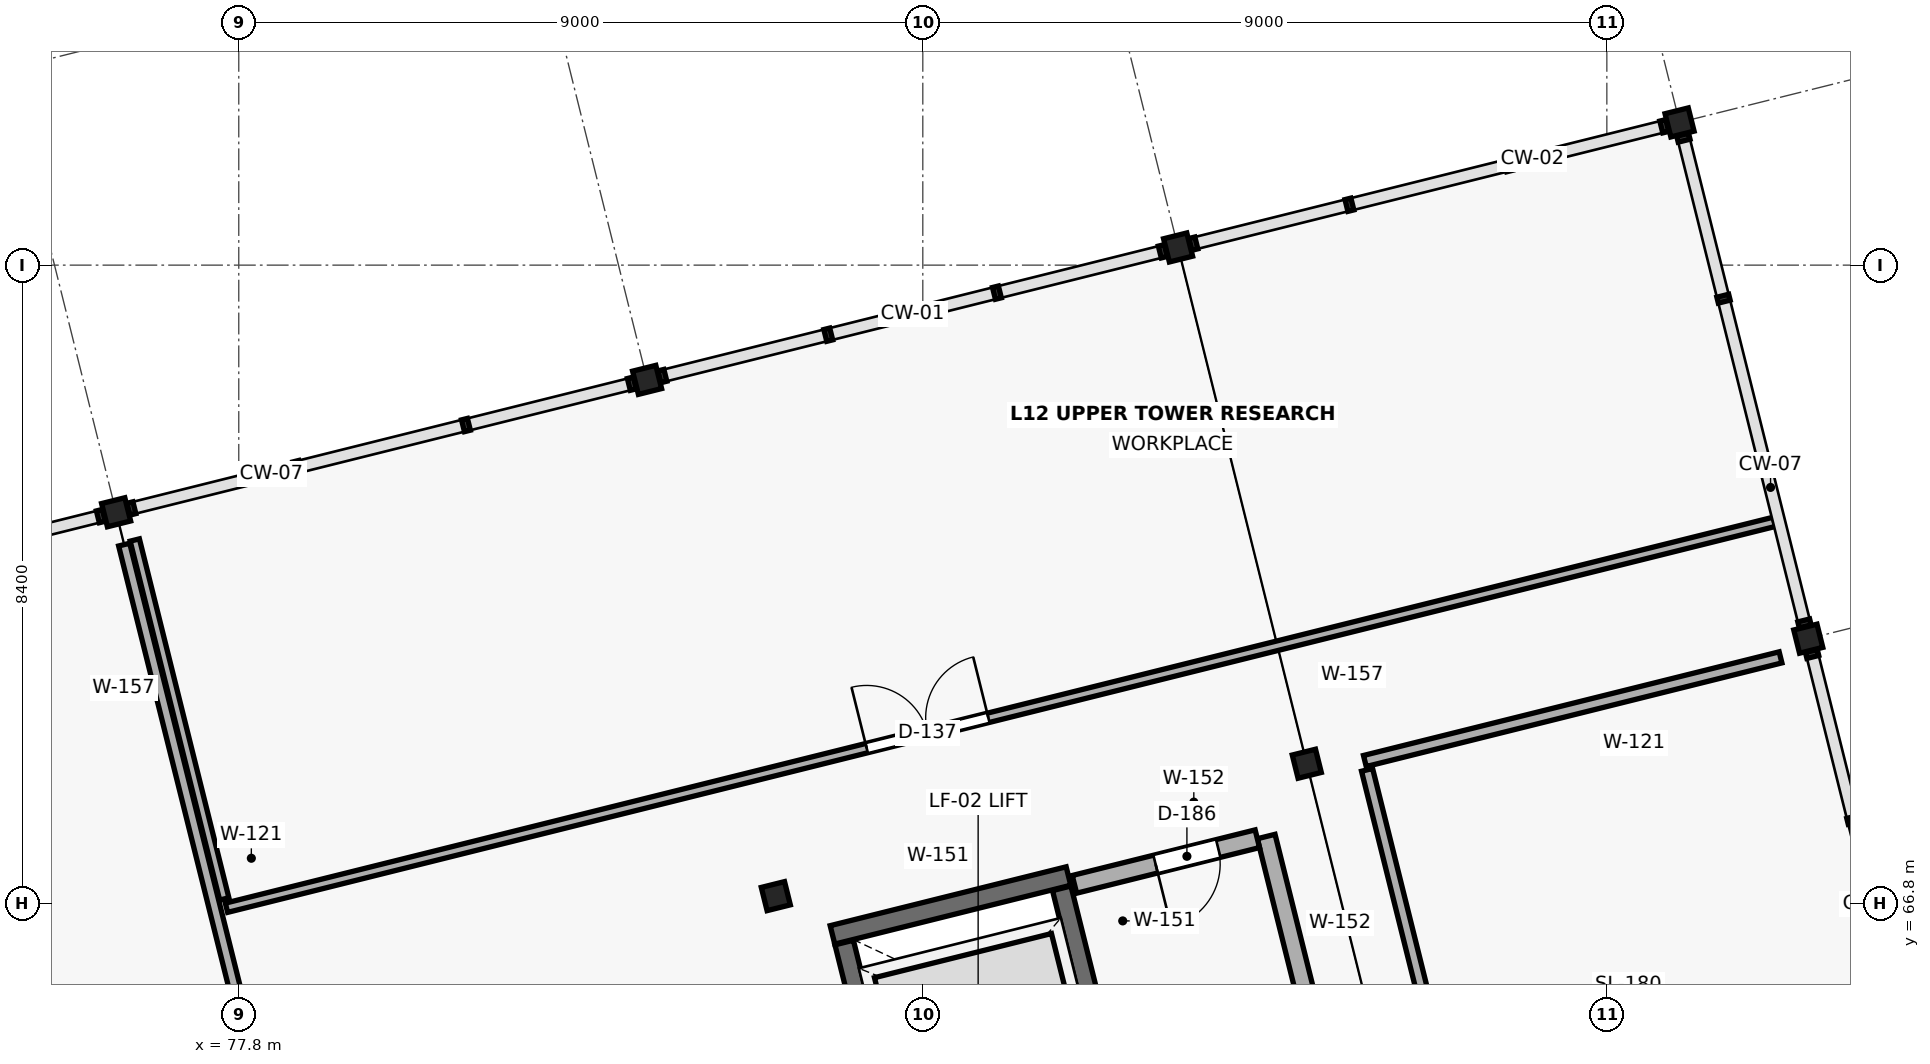
"""IFC4 building model, lengths in metres.
Left out: names, types, materials, properties, quantities, classifications, styles, units other than length and angle.
Written with IfcOpenShell. Run it as: python <this file> out.ifc"""

import sys

from ifc_helpers import new_model, si_unit, direction, frame, frame_2d, origin, origin_2d, place, context, subcontext, project, spatial, rectangle, extrude, element, fill, save


model = new_model("IFC4")
c1 = context("Model", 3, precision=1e-05, world=origin(), true_north=direction((0.0, 1.0)))
c2 = subcontext(c1, "Body", "Model", "MODEL_VIEW")
j1 = project(units=[si_unit("LENGTHUNIT", "METRE"), si_unit("PLANEANGLEUNIT", "RADIAN")], contexts=[c1])
p1 = place(None, origin())
s1 = spatial("IfcSite", under=j1, at=p1, CompositionType="ELEMENT")
p2 = place(p1, origin())
s2 = spatial("IfcBuilding", under=s1, at=p2, CompositionType="ELEMENT")
p3 = place(p2, frame((0.0, 0.0, 49.5)))
s3 = spatial("IfcBuildingStorey", under=s2, at=p3, CompositionType="ELEMENT", Elevation=49.5)
for number, where, z_axis, x_axis in (
    (1, (76.187, 71.949, 0.0), (0.0, 0.0, 1.0), (0.97, 0.242, 0.0)),
    (2, (84.866, 66.898, 0.0), (0.0, 0.0, 1.0), (0.97, 0.242, 0.0)),
    (3, (83.173, 73.691, 0.0), (0.0, 0.0, 1.0), (0.97, 0.242, 0.0)),
    (4, (91.852, 68.64, 0.0), (0.0, 0.0, 1.0), (0.97, 0.242, 0.0)),
    (5, (90.159, 75.432, 0.0), (0.0, 0.0, 1.0), (0.97, 0.242, 0.0)),
    (6, (98.45, 70.285, 0.0), (0.0, 0.0, 1.0), (0.97, 0.242, 0.0)),
    (7, (96.757, 77.077, 0.0), (0.0, 0.0, 1.0), (0.97, 0.242, 0.0)),
):
    element("IfcColumn", number, at=place(p3, frame(where, z_axis=z_axis, x_axis=x_axis)), inside=s3, PredefinedType="COLUMN", context=c2, shape_type="SweptSolid", body=[
        extrude(rectangle(XDim=0.315, YDim=0.315, at=origin_2d()), origin(), (0.0, 0.0, 1.0), 3.9),
    ])
p4 = place(p3, frame((88.717, 67.163, 0.0), z_axis=(0.0, 0.0, 1.0), x_axis=(-0.970294894235, -0.241925232711, 0.0)))
e8 = element("IfcWall", 8, at=p4, inside=s3, PredefinedType="SHEAR", context=c2, shape_type="SweptSolid", body=[
    extrude(rectangle(XDim=3.2, YDim=0.25, at=frame_2d((1.6, 0.0))), origin(), (0.0, 0.0, 1.0), 3.72),
])
for number, where, z_axis, x_axis in (
    (9, (85.766, 66.288, 0.0), (0.0, 0.0, 1.0), (0.242, -0.97, 0.0)),
    (10, (89.155, 64.886, 0.0), (0.0, 0.0, 1.0), (-0.242, 0.97, 0.0)),
):
    element("IfcWall", number, at=place(p3, frame(where, z_axis=z_axis, x_axis=x_axis)), inside=s3, PredefinedType="SHEAR", context=c2, shape_type="SweptSolid", body=[
        extrude(rectangle(XDim=2.18, YDim=0.25, at=frame_2d((1.09, 0.0))), origin(), (0.0, 0.0, 1.0), 3.72),
    ])
p5 = place(p3, frame((91.838, 65.596, 0.0), z_axis=(0.0, 0.0, 1.0), x_axis=(-0.2418676095, 0.970309259708, 0.0)))
e11 = element("IfcWall", 11, at=p5, inside=s3, PredefinedType="STANDARD", context=c2, shape_type="SweptSolid", body=[
    extrude(rectangle(XDim=2.15, YDim=0.24, at=frame_2d((1.075, 0.0))), origin(), (0.0, 0.0, 1.0), 3.72),
])
p6 = place(p3, frame((91.202, 67.654, 0.0), z_axis=(0.0, 0.0, 1.0), x_axis=(-0.970304433136, -0.241886971613, 0.0)))
e12 = element("IfcWall", 12, at=p6, inside=s3, PredefinedType="STANDARD", context=c2, shape_type="SweptSolid", body=[
    extrude(rectangle(XDim=2.48, YDim=0.24, at=frame_2d((1.24, 0.0))), origin(), (0.0, 0.0, 1.0), 3.72),
])
p7 = place(p6, frame((0.53, 0.0, 0.0)))
e13 = element("IfcOpeningElement", 13, at=p7, cuts=e12, PredefinedType="OPENING", context=c2, shape_type="SweptSolid", body=[
    extrude(rectangle(XDim=0.85, YDim=2.1, at=frame_2d((0.425, 1.05))), frame((0.0, 0.132, 0.0), z_axis=(0.0, -1.0, 0.0), x_axis=(1.0, 0.0, 0.0)), (0.0, 0.0, 1.0), 0.264),
])
p8 = place(p3, frame((77.774, 65.582, 0.0), z_axis=(0.0, 0.0, 1.0), x_axis=(-0.241906994497, 0.970299441417, 0.0)))
e14 = element("IfcWall", 14, at=p8, inside=s3, PredefinedType="PARTITIONING", context=c2, shape_type="SweptSolid", body=[
    extrude(rectangle(XDim=6.123, YDim=0.15, at=frame_2d((3.062, 0.0))), origin(), (0.0, 0.0, 1.0), 2.96),
])
p9 = place(p3, frame((77.638, 66.745, 0.0), z_axis=(0.0, 0.0, 1.0), x_axis=(0.970296248646, 0.241919800477, 0.0)))
e15 = element("IfcWall", 15, at=p9, inside=s3, PredefinedType="PARTITIONING", context=c2, shape_type="SweptSolid", body=[
    extrude(rectangle(XDim=20.99, YDim=0.125, at=frame_2d((10.495, 0.0))), origin(), (0.0, 0.0, 1.0), 3.72),
])
p10 = place(p9, frame((8.681, 0.0, 0.0)))
e16 = element("IfcOpeningElement", 16, at=p10, cuts=e15, PredefinedType="OPENING", context=c2, shape_type="SweptSolid", body=[
    extrude(rectangle(XDim=1.65, YDim=2.35, at=frame_2d((0.825, 1.175))), frame((0.0, 0.074, 0.0), z_axis=(0.0, -1.0, 0.0), x_axis=(1.0, 0.0, 0.0)), (0.0, 0.0, 1.0), 0.149),
])
p11 = place(p3, frame((76.432, 71.584, 0.0), z_axis=(0.0, 0.0, 1.0), x_axis=(0.241909950511, -0.970298704443, 0.0)))
e17 = element("IfcWall", 17, at=p11, inside=s3, PredefinedType="PARTITIONING", context=c2, shape_type="SweptSolid", body=[
    extrude(rectangle(XDim=4.866, YDim=0.125, at=frame_2d((2.433, 0.0))), origin(), (0.0, 0.0, 1.0), 3.72),
])
p12 = place(p3, frame((98.085, 70.04, 0.0), z_axis=(0.0, 0.0, 1.0), x_axis=(-0.970300259832, -0.241903711774, 0.0)))
e18 = element("IfcWall", 18, at=p12, inside=s3, PredefinedType="PARTITIONING", context=c2, shape_type="SweptSolid", body=[
    extrude(rectangle(XDim=5.637, YDim=0.15, at=frame_2d((2.818, 0.0))), origin(), (0.0, 0.0, 1.0), 3.72),
])
p13 = place(p3, frame((92.645, 68.56, 0.0), z_axis=(0.0, 0.0, 1.0), x_axis=(0.241925285076, -0.970294881178, 0.0)))
e19 = element("IfcWall", 19, at=p13, inside=s3, PredefinedType="PARTITIONING", context=c2, shape_type="SweptSolid", body=[
    extrude(rectangle(XDim=13.46, YDim=0.15, at=frame_2d((6.73, 0.0))), origin(), (0.0, 0.0, 1.0), 3.72),
])
p14 = place(p13, frame((8.301, 0.0, 0.0)))
e20 = element("IfcOpeningElement", 20, at=p14, cuts=e19, PredefinedType="OPENING", context=c2, shape_type="SweptSolid", body=[
    extrude(rectangle(XDim=1.45, YDim=2.35, at=frame_2d((0.725, 1.175))), frame((0.0, 0.087, 0.0), z_axis=(0.0, -1.0, 0.0), x_axis=(1.0, 0.0, 0.0)), (0.0, 0.0, 1.0), 0.174),
])
p15 = place(p7, origin())
e21 = element("IfcDoor", 21, at=p15, inside=s3, OperationType="SINGLE_SWING_RIGHT", PredefinedType="DOOR", context=c2, shape_type="SweptSolid", body=[
    extrude(rectangle(XDim=0.85, YDim=2.1, at=frame_2d((0.425, 1.05))), frame((0.0, 0.025, 0.0), z_axis=(0.0, -1.0, 0.0), x_axis=(1.0, 0.0, 0.0)), (0.0, 0.0, 1.0), 0.05),
])
fill(e13, e21)
p16 = place(p10, origin())
e22 = element("IfcDoor", 22, at=p16, inside=s3, OperationType="DOUBLE_DOOR_SINGLE_SWING", PredefinedType="DOOR", context=c2, shape_type="SweptSolid", body=[
    extrude(rectangle(XDim=1.65, YDim=2.35, at=frame_2d((0.825, 1.175))), frame((0.0, 0.025, 0.0), z_axis=(0.0, -1.0, 0.0), x_axis=(1.0, 0.0, 0.0)), (0.0, 0.0, 1.0), 0.05),
])
fill(e16, e22)
save(model, sys.argv[1])
